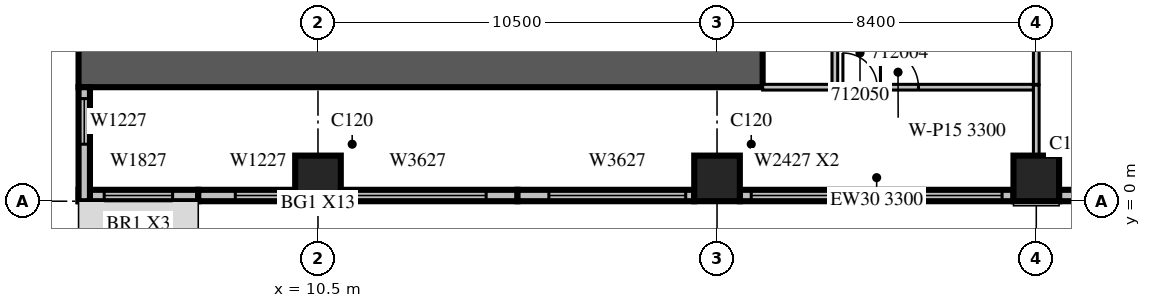
"""IFC4 building model, lengths in metres.
Left out: names, types, materials, properties, quantities, classifications, styles, units other than length and angle.
Written with IfcOpenShell. Run it as: python <this file> out.ifc"""

import sys

from ifc_helpers import new_model, si_unit, direction, frame, frame_2d, origin, origin_2d, place, context, subcontext, project, spatial, rectangle, extrude, source, transform, mapped, element, fill, save


model = new_model("IFC4")
c1 = context("Model", 3, precision=1e-05, world=origin(), true_north=direction((0.0, 1.0)))
c2 = subcontext(c1, "Body", "Model", "MODEL_VIEW")
j1 = project(units=[si_unit("LENGTHUNIT", "METRE"), si_unit("PLANEANGLEUNIT", "RADIAN")], contexts=[c1])
p1 = place(None, origin())
s1 = spatial("IfcSite", under=j1, at=p1, CompositionType="ELEMENT")
p2 = place(p1, origin())
s2 = spatial("IfcBuilding", under=s1, at=p2, CompositionType="ELEMENT")
p3 = place(p2, frame((0.0, 0.0, 61.5)))
s3 = spatial("IfcBuildingStorey", under=s2, at=p3, CompositionType="ELEMENT", Elevation=61.5)
m1 = source(origin(), c2, "Body", "SweptSolid", [
    extrude(rectangle(XDim=1.2, YDim=1.2, at=origin_2d()), origin(), (0.0, 0.0, 1.0), 4.2),
])
for number, where, z_axis, x_axis in (
    (1, (10.5, 0.6, 0.0), (0.0, 0.0, 1.0), (1.0, 0.0, 0.0)),
    (2, (21.0, 0.6, 0.0), (0.0, 0.0, 1.0), (1.0, 0.0, 0.0)),
    (3, (29.4, 0.6, 0.0), (0.0, 0.0, 1.0), (1.0, 0.0, 0.0)),
):
    element("IfcColumn", number, at=place(p3, frame(where, z_axis=z_axis, x_axis=x_axis)), inside=s3, PredefinedType="COLUMN", context=c2, shape_type="MappedRepresentation", body=[
        mapped(m1, transform((0.0, 0.0, 0.0), scale=1.0)),
    ])
m2 = source(origin(), c2, "Body", "SweptSolid", [
    extrude(rectangle(XDim=18.0, YDim=1.2, at=frame_2d((9.0, 0.0))), origin(), (0.0, 0.0, 1.0), 4.2),
])
p4 = place(p3, frame((4.2, 3.6, 0.0), z_axis=(0.0, 0.0, 1.0), x_axis=(1.0, 0.0, 0.0)))
e4 = element("IfcWall", 4, at=p4, inside=s3, PredefinedType="SHEAR", context=c2, shape_type="MappedRepresentation", body=[
    mapped(m2, transform((0.0, 0.0, 0.0), scale=1.0)),
])
m3 = source(origin(), c2, "Body", "SweptSolid", [
    extrude(rectangle(XDim=3.15, YDim=0.3, at=frame_2d((1.575, 0.0))), origin(), (0.0, 0.0, 1.0), 3.8),
])
p5 = place(p3, frame((4.2, 0.15, 0.0), z_axis=(0.0, 0.0, 1.0), x_axis=(1.0, 0.0, 0.0)))
e5 = element("IfcWall", 5, at=p5, inside=s3, PredefinedType="STANDARD", context=c2, shape_type="MappedRepresentation", body=[
    mapped(m3, transform((0.0, 0.0, 0.0), scale=1.0)),
])
m4 = source(origin(), c2, "Body", "SweptSolid", [
    extrude(rectangle(XDim=1.8, YDim=2.7, at=frame_2d((0.9, 1.35))), frame((0.0, 0.16, 0.0), z_axis=(0.0, -1.0, 0.0), x_axis=(1.0, 0.0, 0.0)), (0.0, 0.0, 1.0), 0.32),
])
p6 = place(p5, frame((0.675, 0.0, 0.6)))
e6 = element("IfcOpeningElement", 6, at=p6, cuts=e5, PredefinedType="OPENING", context=c2, shape_type="MappedRepresentation", body=[
    mapped(m4, transform((0.0, 0.0, 0.0), scale=1.0)),
])
m5 = source(origin(), c2, "Body", "SweptSolid", [
    extrude(rectangle(XDim=2.55, YDim=0.3, at=frame_2d((1.275, 0.0))), origin(), (0.0, 0.0, 1.0), 3.8),
])
p7 = place(p3, frame((7.35, 0.15, 0.0), z_axis=(0.0, 0.0, 1.0), x_axis=(1.0, 0.0, 0.0)))
e7 = element("IfcWall", 7, at=p7, inside=s3, PredefinedType="STANDARD", context=c2, shape_type="MappedRepresentation", body=[
    mapped(m5, transform((0.0, 0.0, 0.0), scale=1.0)),
])
m6 = source(origin(), c2, "Body", "SweptSolid", [
    extrude(rectangle(XDim=1.2, YDim=2.7, at=frame_2d((0.6, 1.35))), frame((0.0, 0.16, 0.0), z_axis=(0.0, -1.0, 0.0), x_axis=(1.0, 0.0, 0.0)), (0.0, 0.0, 1.0), 0.32),
])
p8 = place(p7, frame((0.975, 0.0, 0.6)))
e8 = element("IfcOpeningElement", 8, at=p8, cuts=e7, PredefinedType="OPENING", context=c2, shape_type="MappedRepresentation", body=[
    mapped(m6, transform((0.0, 0.0, 0.0), scale=1.0)),
])
m7 = source(origin(), c2, "Body", "SweptSolid", [
    extrude(rectangle(XDim=4.65, YDim=0.3, at=frame_2d((2.325, 0.0))), origin(), (0.0, 0.0, 1.0), 3.8),
])
p9 = place(p3, frame((11.1, 0.15, 0.0), z_axis=(0.0, 0.0, 1.0), x_axis=(1.0, 0.0, 0.0)))
e9 = element("IfcWall", 9, at=p9, inside=s3, PredefinedType="STANDARD", context=c2, shape_type="MappedRepresentation", body=[
    mapped(m7, transform((0.0, 0.0, 0.0), scale=1.0)),
])
m8 = source(origin(), c2, "Body", "SweptSolid", [
    extrude(rectangle(XDim=3.6, YDim=2.7, at=frame_2d((1.8, 1.35))), frame((0.0, 0.16, 0.0), z_axis=(0.0, -1.0, 0.0), x_axis=(1.0, 0.0, 0.0)), (0.0, 0.0, 1.0), 0.32),
])
p10 = place(p9, frame((0.225, 0.0, 0.6)))
e10 = element("IfcOpeningElement", 10, at=p10, cuts=e9, PredefinedType="OPENING", context=c2, shape_type="MappedRepresentation", body=[
    mapped(m8, transform((0.0, 0.0, 0.0), scale=1.0)),
])
p11 = place(p3, frame((15.75, 0.15, 0.0), z_axis=(0.0, 0.0, 1.0), x_axis=(1.0, 0.0, 0.0)))
e11 = element("IfcWall", 11, at=p11, inside=s3, PredefinedType="STANDARD", context=c2, shape_type="MappedRepresentation", body=[
    mapped(m7, transform((0.0, 0.0, 0.0), scale=1.0)),
])
p12 = place(p11, frame((0.825, 0.0, 0.6)))
e12 = element("IfcOpeningElement", 12, at=p12, cuts=e11, PredefinedType="OPENING", context=c2, shape_type="MappedRepresentation", body=[
    mapped(m8, transform((0.0, 0.0, 0.0), scale=1.0)),
])
m9 = source(origin(), c2, "Body", "SweptSolid", [
    extrude(rectangle(XDim=7.2, YDim=0.3, at=frame_2d((3.6, 0.0))), origin(), (0.0, 0.0, 1.0), 3.3),
])
p13 = place(p3, frame((21.6, 0.15, 0.0), z_axis=(0.0, 0.0, 1.0), x_axis=(1.0, 0.0, 0.0)))
e13 = element("IfcWall", 13, at=p13, inside=s3, PredefinedType="STANDARD", context=c2, shape_type="MappedRepresentation", body=[
    mapped(m9, transform((0.0, 0.0, 0.0), scale=1.0)),
])
m10 = source(origin(), c2, "Body", "SweptSolid", [
    extrude(rectangle(XDim=2.4, YDim=2.7, at=frame_2d((1.2, 1.35))), frame((0.0, 0.16, 0.0), z_axis=(0.0, -1.0, 0.0), x_axis=(1.0, 0.0, 0.0)), (0.0, 0.0, 1.0), 0.32),
])
p14 = place(p13, frame((0.3, 0.0, 0.6)))
e14 = element("IfcOpeningElement", 14, at=p14, cuts=e13, PredefinedType="OPENING", context=c2, shape_type="MappedRepresentation", body=[
    mapped(m10, transform((0.0, 0.0, 0.0), scale=1.0)),
])
p15 = place(p13, frame((4.5, 0.0, 0.6)))
e15 = element("IfcOpeningElement", 15, at=p15, cuts=e13, PredefinedType="OPENING", context=c2, shape_type="MappedRepresentation", body=[
    mapped(m10, transform((0.0, 0.0, 0.0), scale=1.0)),
])
m11 = source(origin(), c2, "Body", "SweptSolid", [
    extrude(rectangle(XDim=7.2, YDim=0.3, at=frame_2d((3.6, 0.0))), origin(), (0.0, 0.0, 1.0), 3.8),
])
p16 = place(p3, frame((30.0, 0.15, 0.0), z_axis=(0.0, 0.0, 1.0), x_axis=(1.0, 0.0, 0.0)))
e16 = element("IfcWall", 16, at=p16, inside=s3, PredefinedType="STANDARD", context=c2, shape_type="MappedRepresentation", body=[
    mapped(m11, transform((0.0, 0.0, 0.0), scale=1.0)),
])
p17 = place(p16, frame((2.5, 0.0, 0.6)))
e17 = element("IfcOpeningElement", 17, at=p17, cuts=e16, PredefinedType="OPENING", context=c2, shape_type="MappedRepresentation", body=[
    mapped(m10, transform((0.0, 0.0, 0.0), scale=1.0)),
])
m12 = source(origin(), c2, "Body", "SweptSolid", [
    extrude(rectangle(XDim=3.0, YDim=0.3, at=frame_2d((1.5, 0.0))), origin(), (0.0, 0.0, 1.0), 3.8),
])
p18 = place(p3, frame((4.35, 3.0, 0.0), z_axis=(0.0, 0.0, 1.0), x_axis=(0.0, -1.0, 0.0)))
e18 = element("IfcWall", 18, at=p18, inside=s3, PredefinedType="STANDARD", context=c2, shape_type="MappedRepresentation", body=[
    mapped(m12, transform((0.0, 0.0, 0.0), scale=1.0)),
])
p19 = place(p18, frame((0.3, 0.0, 0.6)))
e19 = element("IfcOpeningElement", 19, at=p19, cuts=e18, PredefinedType="OPENING", context=c2, shape_type="MappedRepresentation", body=[
    mapped(m6, transform((0.0, 0.0, 0.0), scale=1.0)),
])
m13 = source(origin(), c2, "Body", "SweptSolid", [
    extrude(rectangle(XDim=11.625, YDim=0.15, at=frame_2d((5.812, 0.0))), origin(), (0.0, 0.0, 1.0), 2.8),
])
p20 = place(p3, frame((24.1, 14.7, 0.0), z_axis=(0.0, 0.0, 1.0), x_axis=(0.0, -1.0, 0.0)))
e20 = element("IfcWall", 20, at=p20, inside=s3, PredefinedType="PARTITIONING", context=c2, shape_type="MappedRepresentation", body=[
    mapped(m13, transform((0.0, 0.0, 0.0), scale=1.0)),
])
m14 = source(origin(), c2, "Body", "SweptSolid", [
    extrude(rectangle(XDim=0.9, YDim=2.1, at=frame_2d((0.45, 1.05))), frame((0.0, 0.085, 0.0), z_axis=(0.0, -1.0, 0.0), x_axis=(1.0, 0.0, 0.0)), (0.0, 0.0, 1.0), 0.17),
])
p21 = place(p20, frame((8.662, 0.0, 0.0)))
e21 = element("IfcOpeningElement", 21, at=p21, cuts=e20, PredefinedType="OPENING", context=c2, shape_type="MappedRepresentation", body=[
    mapped(m14, transform((0.0, 0.0, 0.0), scale=1.0)),
])
p22 = place(p20, frame((1.975, 0.0, 0.0)))
e22 = element("IfcOpeningElement", 22, at=p22, cuts=e20, PredefinedType="OPENING", context=c2, shape_type="MappedRepresentation", body=[
    mapped(m14, transform((0.0, 0.0, 0.0), scale=1.0)),
])
m15 = source(origin(), c2, "Body", "SweptSolid", [
    extrude(rectangle(XDim=6.826, YDim=0.15, at=frame_2d((3.413, 0.0))), origin(), (0.0, 0.0, 1.0), 3.8),
])
p23 = place(p3, frame((29.4, 3.075, 0.0), z_axis=(0.0, 0.0, 1.0), x_axis=(0.0, 1.0, 0.0)))
e23 = element("IfcWall", 23, at=p23, inside=s3, PredefinedType="PARTITIONING", context=c2, shape_type="MappedRepresentation", body=[
    mapped(m15, transform((0.0, 0.0, 0.0), scale=1.0)),
])
m16 = source(origin(), c2, "Body", "SweptSolid", [
    extrude(rectangle(XDim=7.125, YDim=0.15, at=frame_2d((3.562, 0.0))), origin(), (0.0, 0.0, 1.0), 3.3),
])
p24 = place(p3, frame((22.2, 3.0, 0.0), z_axis=(0.0, 0.0, 1.0), x_axis=(1.0, 0.0, 0.0)))
e24 = element("IfcWall", 24, at=p24, inside=s3, PredefinedType="PARTITIONING", context=c2, shape_type="MappedRepresentation", body=[
    mapped(m16, transform((0.0, 0.0, 0.0), scale=1.0)),
])
m17 = source(origin(), c2, "Body", "SweptSolid", [
    extrude(rectangle(XDim=1.0, YDim=2.1, at=frame_2d((0.5, 1.05))), frame((0.0, 0.085, 0.0), z_axis=(0.0, -1.0, 0.0), x_axis=(1.0, 0.0, 0.0)), (0.0, 0.0, 1.0), 0.17),
])
p25 = place(p24, frame((3.1, 0.0, 0.0)))
e25 = element("IfcOpeningElement", 25, at=p25, cuts=e24, PredefinedType="OPENING", context=c2, shape_type="MappedRepresentation", body=[
    mapped(m17, transform((0.0, 0.0, 0.0), scale=1.0)),
])
p26 = place(p24, frame((2.112, 0.0, 0.0)))
e26 = element("IfcOpeningElement", 26, at=p26, cuts=e24, PredefinedType="OPENING", context=c2, shape_type="MappedRepresentation", body=[
    mapped(m14, transform((0.0, 0.0, 0.0), scale=1.0)),
])
m18 = source(origin(), c2, "Body", "SweptSolid", [
    extrude(rectangle(XDim=1.856, YDim=0.15, at=frame_2d((0.928, 0.0))), origin(), (0.0, 0.0, 1.0), 3.8),
])
p27 = place(p3, frame((29.4, 1.199, 0.0), z_axis=(0.0, 0.0, 1.0), x_axis=(0.0, 1.0, 0.0)))
e27 = element("IfcWall", 27, at=p27, inside=s3, PredefinedType="PARTITIONING", context=c2, shape_type="MappedRepresentation", body=[
    mapped(m18, transform((0.0, 0.0, 0.0), scale=1.0)),
])
m19 = source(origin(), c2, "Body", "SweptSolid", [
    extrude(rectangle(XDim=1.8, YDim=2.7, at=frame_2d((0.9, 1.35))), frame((0.0, 0.03, 0.0), z_axis=(0.0, -1.0, 0.0), x_axis=(1.0, 0.0, 0.0)), (0.0, 0.0, 1.0), 0.06),
])
p28 = place(p6, origin())
e28 = element("IfcWindow", 28, at=p28, inside=s3, PartitioningType="SINGLE_PANEL", PredefinedType="WINDOW", context=c2, shape_type="MappedRepresentation", body=[
    mapped(m19, transform((0.0, 0.0, 0.0), scale=1.0)),
])
fill(e6, e28)
m20 = source(origin(), c2, "Body", "SweptSolid", [
    extrude(rectangle(XDim=1.2, YDim=2.7, at=frame_2d((0.6, 1.35))), frame((0.0, 0.03, 0.0), z_axis=(0.0, -1.0, 0.0), x_axis=(1.0, 0.0, 0.0)), (0.0, 0.0, 1.0), 0.06),
])
p29 = place(p8, origin())
e29 = element("IfcWindow", 29, at=p29, inside=s3, PartitioningType="SINGLE_PANEL", PredefinedType="WINDOW", context=c2, shape_type="MappedRepresentation", body=[
    mapped(m20, transform((0.0, 0.0, 0.0), scale=1.0)),
])
fill(e8, e29)
m21 = source(origin(), c2, "Body", "SweptSolid", [
    extrude(rectangle(XDim=3.6, YDim=2.7, at=frame_2d((1.8, 1.35))), frame((0.0, 0.03, 0.0), z_axis=(0.0, -1.0, 0.0), x_axis=(1.0, 0.0, 0.0)), (0.0, 0.0, 1.0), 0.06),
])
p30 = place(p10, origin())
e30 = element("IfcWindow", 30, at=p30, inside=s3, PartitioningType="SINGLE_PANEL", PredefinedType="WINDOW", context=c2, shape_type="MappedRepresentation", body=[
    mapped(m21, transform((0.0, 0.0, 0.0), scale=1.0)),
])
fill(e10, e30)
p31 = place(p12, origin())
e31 = element("IfcWindow", 31, at=p31, inside=s3, PartitioningType="SINGLE_PANEL", PredefinedType="WINDOW", context=c2, shape_type="MappedRepresentation", body=[
    mapped(m21, transform((0.0, 0.0, 0.0), scale=1.0)),
])
fill(e12, e31)
m22 = source(origin(), c2, "Body", "SweptSolid", [
    extrude(rectangle(XDim=2.4, YDim=2.7, at=frame_2d((1.2, 1.35))), frame((0.0, 0.03, 0.0), z_axis=(0.0, -1.0, 0.0), x_axis=(1.0, 0.0, 0.0)), (0.0, 0.0, 1.0), 0.06),
])
p32 = place(p14, origin())
e32 = element("IfcWindow", 32, at=p32, inside=s3, PartitioningType="SINGLE_PANEL", PredefinedType="WINDOW", context=c2, shape_type="MappedRepresentation", body=[
    mapped(m22, transform((0.0, 0.0, 0.0), scale=1.0)),
])
fill(e14, e32)
p33 = place(p15, origin())
e33 = element("IfcWindow", 33, at=p33, inside=s3, PartitioningType="SINGLE_PANEL", PredefinedType="WINDOW", context=c2, shape_type="MappedRepresentation", body=[
    mapped(m22, transform((0.0, 0.0, 0.0), scale=1.0)),
])
fill(e15, e33)
p34 = place(p19, origin())
e34 = element("IfcWindow", 34, at=p34, inside=s3, PartitioningType="SINGLE_PANEL", PredefinedType="WINDOW", context=c2, shape_type="MappedRepresentation", body=[
    mapped(m20, transform((0.0, 0.0, 0.0), scale=1.0)),
])
fill(e19, e34)
m23 = source(origin(), c2, "Body", "SweptSolid", [
    extrude(rectangle(XDim=1.0, YDim=2.1, at=frame_2d((0.5, 1.05))), frame((0.0, 0.025, 0.0), z_axis=(0.0, -1.0, 0.0), x_axis=(1.0, 0.0, 0.0)), (0.0, 0.0, 1.0), 0.05),
])
p35 = place(p25, origin())
e35 = element("IfcDoor", 35, at=p35, inside=s3, OperationType="SINGLE_SWING_LEFT", PredefinedType="DOOR", context=c2, shape_type="MappedRepresentation", body=[
    mapped(m23, transform((0.0, 0.0, 0.0), scale=1.0)),
])
fill(e25, e35)
m24 = source(origin(), c2, "Body", "SweptSolid", [
    extrude(rectangle(XDim=0.9, YDim=2.1, at=frame_2d((0.45, 1.05))), frame((0.0, 0.025, 0.0), z_axis=(0.0, -1.0, 0.0), x_axis=(1.0, 0.0, 0.0)), (0.0, 0.0, 1.0), 0.05),
])
p36 = place(p26, origin())
e36 = element("IfcDoor", 36, at=p36, inside=s3, OperationType="SINGLE_SWING_LEFT", PredefinedType="DOOR", context=c2, shape_type="MappedRepresentation", body=[
    mapped(m24, transform((0.0, 0.0, 0.0), scale=1.0)),
])
fill(e26, e36)
save(model, sys.argv[1])
